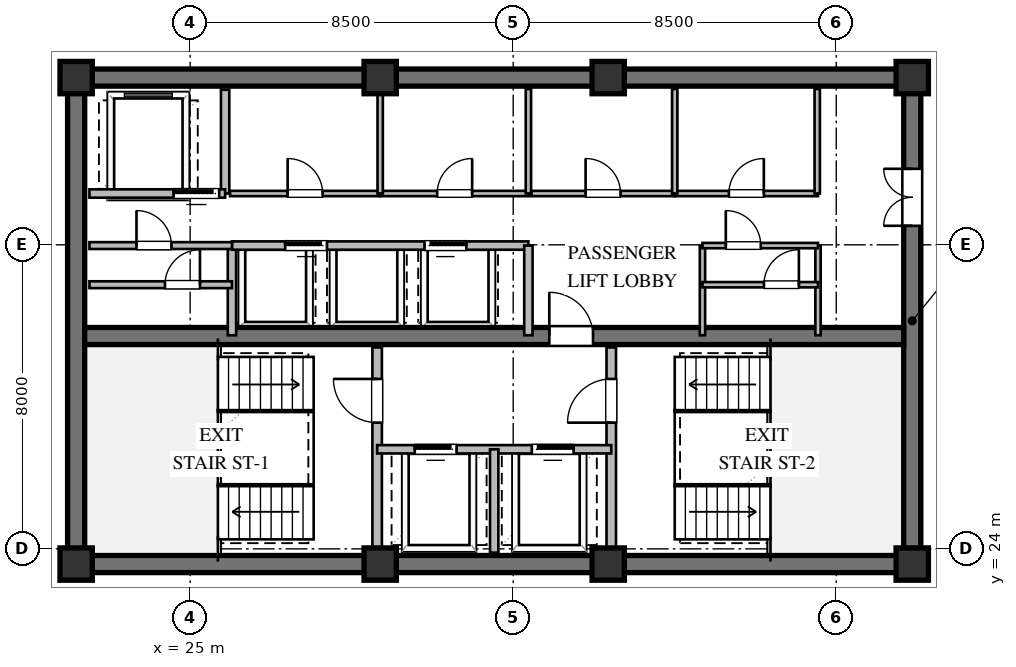
"""IFC4 building model, lengths in metres.
Left out: names, types, materials, properties, quantities, classifications, styles, units other than length and angle.
Written with IfcOpenShell. Run it as: python <this file> out.ifc"""

import sys

from ifc_helpers import new_model, si_unit, direction, frame, frame_2d, origin, origin_2d, place, context, subcontext, project, spatial, rectangle, extrude, element, fill, save


model = new_model("IFC4")
c1 = context("Model", 3, precision=1e-05, world=origin(), true_north=direction((0.0, 1.0)))
c2 = subcontext(c1, "Body", "Model", "MODEL_VIEW")
j1 = project(units=[si_unit("LENGTHUNIT", "METRE"), si_unit("PLANEANGLEUNIT", "RADIAN")], contexts=[c1])
p1 = place(None, origin())
s1 = spatial("IfcSite", under=j1, at=p1, CompositionType="ELEMENT")
p2 = place(p1, origin())
s2 = spatial("IfcBuilding", under=s1, at=p2, CompositionType="ELEMENT")
p3 = place(p2, frame((0.0, 0.0, 246.0)))
s3 = spatial("IfcBuildingStorey", under=s2, at=p3, CompositionType="ELEMENT", Elevation=246.0)
for number, where, z_axis, x_axis in (
    (1, (21.775, 23.6, 0.0), (0.0, 0.0, 1.0), (1.0, 0.0, 0.0)),
    (2, (21.775, 36.4, 0.0), (0.0, 0.0, 1.0), (1.0, 0.0, 0.0)),
):
    element("IfcWall", number, at=place(p3, frame(where, z_axis=z_axis, x_axis=x_axis)), inside=s3, PredefinedType="SHEAR", context=c2, shape_type="SweptSolid", body=[
        extrude(rectangle(XDim=22.45, YDim=0.45, at=frame_2d((11.225, 0.0))), origin(), (0.0, 0.0, 1.0), 3.36),
    ])
p4 = place(p3, frame((22.0, 23.825, 0.0), z_axis=(0.0, 0.0, 1.0), x_axis=(0.0, 1.0, 0.0)))
e3 = element("IfcWall", 3, at=p4, inside=s3, PredefinedType="SHEAR", context=c2, shape_type="SweptSolid", body=[
    extrude(rectangle(XDim=12.35, YDim=0.45, at=frame_2d((6.175, 0.0))), origin(), (0.0, 0.0, 1.0), 3.36),
])
p5 = place(p3, frame((44.0, 23.825, 0.0), z_axis=(0.0, 0.0, 1.0), x_axis=(0.0, 1.0, 0.0)))
e4 = element("IfcWall", 4, at=p5, inside=s3, PredefinedType="SHEAR", context=c2, shape_type="SweptSolid", body=[
    extrude(rectangle(XDim=12.35, YDim=0.45, at=frame_2d((6.175, 0.0))), origin(), (0.0, 0.0, 1.0), 3.36),
])
p6 = place(p5, frame((8.675, 0.0, 0.0)))
e5 = element("IfcOpeningElement", 5, at=p6, cuts=e4, PredefinedType="OPENING", context=c2, shape_type="SweptSolid", body=[
    extrude(rectangle(XDim=1.5, YDim=2.15, at=frame_2d((0.75, 1.075))), frame((0.0, 0.235, 0.0), z_axis=(0.0, -1.0, 0.0), x_axis=(1.0, 0.0, 0.0)), (0.0, 0.0, 1.0), 0.47),
])
p7 = place(p3, frame((22.225, 29.6, 0.0), z_axis=(0.0, 0.0, 1.0), x_axis=(1.0, 0.0, 0.0)))
e6 = element("IfcWall", 6, at=p7, inside=s3, PredefinedType="SHEAR", context=c2, shape_type="SweptSolid", body=[
    extrude(rectangle(XDim=21.55, YDim=0.45, at=frame_2d((10.775, 0.0))), origin(), (0.0, 0.0, 1.0), 3.36),
])
p8 = place(p7, frame((12.225, 0.0, 0.0)))
e7 = element("IfcOpeningElement", 7, at=p8, cuts=e6, PredefinedType="OPENING", context=c2, shape_type="SweptSolid", body=[
    extrude(rectangle(XDim=1.15, YDim=2.1, at=frame_2d((0.575, 1.05))), frame((0.0, 0.235, 0.0), z_axis=(0.0, -1.0, 0.0), x_axis=(1.0, 0.0, 0.0)), (0.0, 0.0, 1.0), 0.47),
])
for number, where, z_axis, x_axis in (
    (8, (22.0, 23.6, 0.0), (0.0, 0.0, 1.0), (1.0, 0.0, 0.0)),
    (9, (30.0, 23.6, 0.0), (0.0, 0.0, 1.0), (1.0, 0.0, 0.0)),
    (10, (36.0, 23.6, 0.0), (0.0, 0.0, 1.0), (1.0, 0.0, 0.0)),
    (11, (44.0, 23.6, 0.0), (0.0, 0.0, 1.0), (1.0, 0.0, 0.0)),
    (12, (44.0, 36.4, 0.0), (0.0, 0.0, 1.0), (1.0, 0.0, 0.0)),
    (13, (36.0, 36.4, 0.0), (0.0, 0.0, 1.0), (1.0, 0.0, 0.0)),
    (14, (30.0, 36.4, 0.0), (0.0, 0.0, 1.0), (1.0, 0.0, 0.0)),
    (15, (22.0, 36.4, 0.0), (0.0, 0.0, 1.0), (1.0, 0.0, 0.0)),
):
    element("IfcColumn", number, at=place(p3, frame(where, z_axis=z_axis, x_axis=x_axis)), inside=s3, PredefinedType="COLUMN", context=c2, shape_type="SweptSolid", body=[
        extrude(rectangle(XDim=0.85, YDim=0.85, at=origin_2d()), origin(), (0.0, 0.0, 1.0), 3.6),
    ])
p9 = place(p3, frame((29.92, 23.9, 0.0), z_axis=(0.0, 0.0, 1.0), x_axis=(0.0, 1.0, 0.0)))
e16 = element("IfcWall", 16, at=p9, inside=s3, PredefinedType="SOLIDWALL", context=c2, shape_type="SweptSolid", body=[
    extrude(rectangle(XDim=5.4, YDim=0.25, at=frame_2d((2.7, 0.0))), origin(), (0.0, 0.0, 1.0), 3.36),
])
p10 = place(p9, frame((3.421, 0.0, 0.0)))
e17 = element("IfcOpeningElement", 17, at=p10, cuts=e16, PredefinedType="OPENING", context=c2, shape_type="SweptSolid", body=[
    extrude(rectangle(XDim=1.15, YDim=2.1, at=frame_2d((0.575, 1.05))), frame((0.0, 0.135, 0.0), z_axis=(0.0, -1.0, 0.0), x_axis=(1.0, 0.0, 0.0)), (0.0, 0.0, 1.0), 0.27),
])
p11 = place(p3, frame((36.08, 23.9, 0.0), z_axis=(0.0, 0.0, 1.0), x_axis=(0.0, 1.0, 0.0)))
e18 = element("IfcWall", 18, at=p11, inside=s3, PredefinedType="SOLIDWALL", context=c2, shape_type="SweptSolid", body=[
    extrude(rectangle(XDim=5.4, YDim=0.25, at=frame_2d((2.7, 0.0))), origin(), (0.0, 0.0, 1.0), 3.36),
])
p12 = place(p11, frame((3.421, 0.0, 0.0)))
e19 = element("IfcOpeningElement", 19, at=p12, cuts=e18, PredefinedType="OPENING", context=c2, shape_type="SweptSolid", body=[
    extrude(rectangle(XDim=1.15, YDim=2.1, at=frame_2d((0.575, 1.05))), frame((0.0, 0.135, 0.0), z_axis=(0.0, -1.0, 0.0), x_axis=(1.0, 0.0, 0.0)), (0.0, 0.0, 1.0), 0.27),
])
p13 = place(p3, frame((29.92, 26.62, 0.0), z_axis=(0.0, 0.0, 1.0), x_axis=(1.0, 0.0, 0.0)))
e20 = element("IfcWall", 20, at=p13, inside=s3, PredefinedType="SOLIDWALL", context=c2, shape_type="SweptSolid", body=[
    extrude(rectangle(XDim=6.16, YDim=0.22, at=frame_2d((3.08, 0.0))), origin(), (0.0, 0.0, 1.0), 3.36),
])
p14 = place(p13, frame((0.99, 0.0, 0.0)))
e21 = element("IfcOpeningElement", 21, at=p14, cuts=e20, PredefinedType="OPENING", context=c2, shape_type="SweptSolid", body=[
    extrude(rectangle(XDim=1.1, YDim=2.1, at=frame_2d((0.55, 1.05))), frame((0.0, 0.12, 0.0), z_axis=(0.0, -1.0, 0.0), x_axis=(1.0, 0.0, 0.0)), (0.0, 0.0, 1.0), 0.24),
])
p15 = place(p13, frame((4.07, 0.0, 0.0)))
e22 = element("IfcOpeningElement", 22, at=p15, cuts=e20, PredefinedType="OPENING", context=c2, shape_type="SweptSolid", body=[
    extrude(rectangle(XDim=1.1, YDim=2.1, at=frame_2d((0.55, 1.05))), frame((0.0, 0.12, 0.0), z_axis=(0.0, -1.0, 0.0), x_axis=(1.0, 0.0, 0.0)), (0.0, 0.0, 1.0), 0.24),
])
p16 = place(p3, frame((33.0, 23.9, 0.0), z_axis=(0.0, 0.0, 1.0), x_axis=(0.0, 1.0, 0.0)))
e23 = element("IfcWall", 23, at=p16, inside=s3, PredefinedType="SOLIDWALL", context=c2, shape_type="SweptSolid", body=[
    extrude(rectangle(XDim=2.72, YDim=0.22, at=frame_2d((1.36, 0.0))), origin(), (0.0, 0.0, 1.0), 3.36),
])
p17 = place(p3, frame((25.92, 33.35, 0.0), z_axis=(0.0, 0.0, 1.0), x_axis=(0.0, 1.0, 0.0)))
e24 = element("IfcWall", 24, at=p17, inside=s3, PredefinedType="SOLIDWALL", context=c2, shape_type="SweptSolid", body=[
    extrude(rectangle(XDim=2.73, YDim=0.22, at=frame_2d((1.365, 0.0))), origin(), (0.0, 0.0, 1.0), 3.36),
])
p18 = place(p3, frame((22.35, 33.35, 0.0), z_axis=(0.0, 0.0, 1.0), x_axis=(1.0, 0.0, 0.0)))
e25 = element("IfcWall", 25, at=p18, inside=s3, PredefinedType="SOLIDWALL", context=c2, shape_type="SweptSolid", body=[
    extrude(rectangle(XDim=3.57, YDim=0.22, at=frame_2d((1.785, 0.0))), origin(), (0.0, 0.0, 1.0), 3.36),
])
p19 = place(p18, frame((2.213, 0.0, 0.0)))
e26 = element("IfcOpeningElement", 26, at=p19, cuts=e25, PredefinedType="OPENING", context=c2, shape_type="SweptSolid", body=[
    extrude(rectangle(XDim=1.2, YDim=2.1, at=frame_2d((0.6, 1.05))), frame((0.0, 0.12, 0.0), z_axis=(0.0, -1.0, 0.0), x_axis=(1.0, 0.0, 0.0)), (0.0, 0.0, 1.0), 0.24),
])
p20 = place(p3, frame((26.1, 29.62, 0.0), z_axis=(0.0, 0.0, 1.0), x_axis=(0.0, 1.0, 0.0)))
e27 = element("IfcWall", 27, at=p20, inside=s3, PredefinedType="SOLIDWALL", context=c2, shape_type="SweptSolid", body=[
    extrude(rectangle(XDim=2.36, YDim=0.22, at=frame_2d((1.18, 0.0))), origin(), (0.0, 0.0, 1.0), 3.36),
])
p21 = place(p3, frame((26.1, 31.98, 0.0), z_axis=(0.0, 0.0, 1.0), x_axis=(1.0, 0.0, 0.0)))
e28 = element("IfcWall", 28, at=p21, inside=s3, PredefinedType="SOLIDWALL", context=c2, shape_type="SweptSolid", body=[
    extrude(rectangle(XDim=7.8, YDim=0.22, at=frame_2d((3.9, 0.0))), origin(), (0.0, 0.0, 1.0), 3.36),
])
p22 = place(p21, frame((1.4, 0.0, 0.0)))
e29 = element("IfcOpeningElement", 29, at=p22, cuts=e28, PredefinedType="OPENING", context=c2, shape_type="SweptSolid", body=[
    extrude(rectangle(XDim=1.1, YDim=2.1, at=frame_2d((0.55, 1.05))), frame((0.0, 0.12, 0.0), z_axis=(0.0, -1.0, 0.0), x_axis=(1.0, 0.0, 0.0)), (0.0, 0.0, 1.0), 0.24),
])
p23 = place(p21, frame((5.066, 0.0, 0.0)))
e30 = element("IfcOpeningElement", 30, at=p23, cuts=e28, PredefinedType="OPENING", context=c2, shape_type="SweptSolid", body=[
    extrude(rectangle(XDim=1.1, YDim=2.1, at=frame_2d((0.55, 1.05))), frame((0.0, 0.12, 0.0), z_axis=(0.0, -1.0, 0.0), x_axis=(1.0, 0.0, 0.0)), (0.0, 0.0, 1.0), 0.24),
])
p24 = place(p3, frame((33.9, 29.62, 0.0), z_axis=(0.0, 0.0, 1.0), x_axis=(0.0, 1.0, 0.0)))
e31 = element("IfcWall", 31, at=p24, inside=s3, PredefinedType="SOLIDWALL", context=c2, shape_type="SweptSolid", body=[
    extrude(rectangle(XDim=2.36, YDim=0.22, at=frame_2d((1.18, 0.0))), origin(), (0.0, 0.0, 1.0), 3.36),
])
p25 = place(p3, frame((26.05, 33.35, 0.0), z_axis=(0.0, 0.0, 1.0), x_axis=(1.0, 0.0, 0.0)))
e32 = element("IfcWall", 32, at=p25, inside=s3, PredefinedType="PARTITIONING", context=c2, shape_type="SweptSolid", body=[
    extrude(rectangle(XDim=3.95, YDim=0.14, at=frame_2d((1.975, 0.0))), origin(), (0.0, 0.0, 1.0), 3.36),
])
p26 = place(p25, frame((1.515, 0.0, 0.0)))
e33 = element("IfcOpeningElement", 33, at=p26, cuts=e32, PredefinedType="OPENING", context=c2, shape_type="SweptSolid", body=[
    extrude(rectangle(XDim=0.92, YDim=2.1, at=frame_2d((0.46, 1.05))), frame((0.0, 0.08, 0.0), z_axis=(0.0, -1.0, 0.0), x_axis=(1.0, 0.0, 0.0)), (0.0, 0.0, 1.0), 0.16),
])
p27 = place(p3, frame((30.0, 33.35, 0.0), z_axis=(0.0, 0.0, 1.0), x_axis=(1.0, 0.0, 0.0)))
e34 = element("IfcWall", 34, at=p27, inside=s3, PredefinedType="PARTITIONING", context=c2, shape_type="SweptSolid", body=[
    extrude(rectangle(XDim=3.92, YDim=0.14, at=frame_2d((1.96, 0.0))), origin(), (0.0, 0.0, 1.0), 3.36),
])
p28 = place(p27, frame((1.5, 0.0, 0.0)))
e35 = element("IfcOpeningElement", 35, at=p28, cuts=e34, PredefinedType="OPENING", context=c2, shape_type="SweptSolid", body=[
    extrude(rectangle(XDim=0.92, YDim=2.1, at=frame_2d((0.46, 1.05))), frame((0.0, 0.08, 0.0), z_axis=(0.0, -1.0, 0.0), x_axis=(1.0, 0.0, 0.0)), (0.0, 0.0, 1.0), 0.16),
])
for number, where, z_axis, x_axis in (
    (36, (30.0, 33.35, 0.0), (0.0, 0.0, 1.0), (0.0, 1.0, 0.0)),
    (37, (33.9, 33.35, 0.0), (0.0, 0.0, 1.0), (0.0, 1.0, 0.0)),
):
    element("IfcWall", number, at=place(p3, frame(where, z_axis=z_axis, x_axis=x_axis)), inside=s3, PredefinedType="PARTITIONING", context=c2, shape_type="SweptSolid", body=[
        extrude(rectangle(XDim=2.75, YDim=0.14, at=frame_2d((1.375, 0.0))), origin(), (0.0, 0.0, 1.0), 3.36),
    ])
p29 = place(p3, frame((33.98, 33.35, 0.0), z_axis=(0.0, 0.0, 1.0), x_axis=(1.0, 0.0, 0.0)))
e38 = element("IfcWall", 38, at=p29, inside=s3, PredefinedType="PARTITIONING", context=c2, shape_type="SweptSolid", body=[
    extrude(rectangle(XDim=3.77, YDim=0.14, at=frame_2d((1.885, 0.0))), origin(), (0.0, 0.0, 1.0), 3.36),
])
p30 = place(p29, frame((1.425, 0.0, 0.0)))
e39 = element("IfcOpeningElement", 39, at=p30, cuts=e38, PredefinedType="OPENING", context=c2, shape_type="SweptSolid", body=[
    extrude(rectangle(XDim=0.92, YDim=2.1, at=frame_2d((0.46, 1.05))), frame((0.0, 0.08, 0.0), z_axis=(0.0, -1.0, 0.0), x_axis=(1.0, 0.0, 0.0)), (0.0, 0.0, 1.0), 0.16),
])
p31 = place(p3, frame((37.75, 33.35, 0.0), z_axis=(0.0, 0.0, 1.0), x_axis=(1.0, 0.0, 0.0)))
e40 = element("IfcWall", 40, at=p31, inside=s3, PredefinedType="PARTITIONING", context=c2, shape_type="SweptSolid", body=[
    extrude(rectangle(XDim=3.77, YDim=0.14, at=frame_2d((1.885, 0.0))), origin(), (0.0, 0.0, 1.0), 3.36),
])
p32 = place(p31, frame((1.425, 0.0, 0.0)))
e41 = element("IfcOpeningElement", 41, at=p32, cuts=e40, PredefinedType="OPENING", context=c2, shape_type="SweptSolid", body=[
    extrude(rectangle(XDim=0.92, YDim=2.1, at=frame_2d((0.46, 1.05))), frame((0.0, 0.08, 0.0), z_axis=(0.0, -1.0, 0.0), x_axis=(1.0, 0.0, 0.0)), (0.0, 0.0, 1.0), 0.16),
])
for number, where, z_axis, x_axis in (
    (42, (37.75, 33.35, 0.0), (0.0, 0.0, 1.0), (0.0, 1.0, 0.0)),
    (43, (41.5, 33.35, 0.0), (0.0, 0.0, 1.0), (0.0, 1.0, 0.0)),
):
    element("IfcWall", number, at=place(p3, frame(where, z_axis=z_axis, x_axis=x_axis)), inside=s3, PredefinedType="PARTITIONING", context=c2, shape_type="SweptSolid", body=[
        extrude(rectangle(XDim=2.75, YDim=0.14, at=frame_2d((1.375, 0.0))), origin(), (0.0, 0.0, 1.0), 3.36),
    ])
p33 = place(p3, frame((22.35, 30.95, 0.0), z_axis=(0.0, 0.0, 1.0), x_axis=(1.0, 0.0, 0.0)))
e44 = element("IfcWall", 44, at=p33, inside=s3, PredefinedType="PARTITIONING", context=c2, shape_type="SweptSolid", body=[
    extrude(rectangle(XDim=3.75, YDim=0.18, at=frame_2d((1.875, 0.0))), origin(), (0.0, 0.0, 1.0), 3.36),
])
p34 = place(p33, frame((1.988, 0.0, 0.0)))
e45 = element("IfcOpeningElement", 45, at=p34, cuts=e44, PredefinedType="OPENING", context=c2, shape_type="SweptSolid", body=[
    extrude(rectangle(XDim=0.92, YDim=2.1, at=frame_2d((0.46, 1.05))), frame((0.0, 0.1, 0.0), z_axis=(0.0, -1.0, 0.0), x_axis=(1.0, 0.0, 0.0)), (0.0, 0.0, 1.0), 0.2),
])
p35 = place(p3, frame((22.35, 31.98, 0.0), z_axis=(0.0, 0.0, 1.0), x_axis=(1.0, 0.0, 0.0)))
e46 = element("IfcWall", 46, at=p35, inside=s3, PredefinedType="PARTITIONING", context=c2, shape_type="SweptSolid", body=[
    extrude(rectangle(XDim=3.75, YDim=0.18, at=frame_2d((1.875, 0.0))), origin(), (0.0, 0.0, 1.0), 3.36),
])
p36 = place(p35, frame((1.238, 0.0, 0.0)))
e47 = element("IfcOpeningElement", 47, at=p36, cuts=e46, PredefinedType="OPENING", context=c2, shape_type="SweptSolid", body=[
    extrude(rectangle(XDim=0.92, YDim=2.1, at=frame_2d((0.46, 1.05))), frame((0.0, 0.1, 0.0), z_axis=(0.0, -1.0, 0.0), x_axis=(1.0, 0.0, 0.0)), (0.0, 0.0, 1.0), 0.2),
])
for number, where, z_axis, x_axis in (
    (48, (38.48, 29.62, 0.0), (0.0, 0.0, 1.0), (0.0, 1.0, 0.0)),
    (49, (41.52, 29.62, 0.0), (0.0, 0.0, 1.0), (0.0, 1.0, 0.0)),
):
    element("IfcWall", number, at=place(p3, frame(where, z_axis=z_axis, x_axis=x_axis)), inside=s3, PredefinedType="PARTITIONING", context=c2, shape_type="SweptSolid", body=[
        extrude(rectangle(XDim=2.36, YDim=0.14, at=frame_2d((1.18, 0.0))), origin(), (0.0, 0.0, 1.0), 3.36),
    ])
p37 = place(p3, frame((38.48, 30.95, 0.0), z_axis=(0.0, 0.0, 1.0), x_axis=(1.0, 0.0, 0.0)))
e50 = element("IfcWall", 50, at=p37, inside=s3, PredefinedType="PARTITIONING", context=c2, shape_type="SweptSolid", body=[
    extrude(rectangle(XDim=3.04, YDim=0.14, at=frame_2d((1.52, 0.0))), origin(), (0.0, 0.0, 1.0), 3.36),
])
p38 = place(p37, frame((1.617, 0.0, 0.0)))
e51 = element("IfcOpeningElement", 51, at=p38, cuts=e50, PredefinedType="OPENING", context=c2, shape_type="SweptSolid", body=[
    extrude(rectangle(XDim=0.92, YDim=2.1, at=frame_2d((0.46, 1.05))), frame((0.0, 0.08, 0.0), z_axis=(0.0, -1.0, 0.0), x_axis=(1.0, 0.0, 0.0)), (0.0, 0.0, 1.0), 0.16),
])
p39 = place(p3, frame((38.48, 31.98, 0.0), z_axis=(0.0, 0.0, 1.0), x_axis=(1.0, 0.0, 0.0)))
e52 = element("IfcWall", 52, at=p39, inside=s3, PredefinedType="PARTITIONING", context=c2, shape_type="SweptSolid", body=[
    extrude(rectangle(XDim=3.04, YDim=0.14, at=frame_2d((1.52, 0.0))), origin(), (0.0, 0.0, 1.0), 3.36),
])
p40 = place(p39, frame((0.614, 0.0, 0.0)))
e53 = element("IfcOpeningElement", 53, at=p40, cuts=e52, PredefinedType="OPENING", context=c2, shape_type="SweptSolid", body=[
    extrude(rectangle(XDim=0.92, YDim=2.1, at=frame_2d((0.46, 1.05))), frame((0.0, 0.08, 0.0), z_axis=(0.0, -1.0, 0.0), x_axis=(1.0, 0.0, 0.0)), (0.0, 0.0, 1.0), 0.16),
])
p41 = place(p10, origin())
e54 = element("IfcDoor", 54, at=p41, inside=s3, OperationType="SINGLE_SWING_RIGHT", PredefinedType="DOOR", context=c2, shape_type="SweptSolid", body=[
    extrude(rectangle(XDim=1.15, YDim=2.1, at=frame_2d((0.575, 1.05))), frame((0.0, 0.025, 0.0), z_axis=(0.0, -1.0, 0.0), x_axis=(1.0, 0.0, 0.0)), (0.0, 0.0, 1.0), 0.05),
])
fill(e17, e54)
p42 = place(p12, origin())
e55 = element("IfcDoor", 55, at=p42, inside=s3, OperationType="SINGLE_SWING_LEFT", PredefinedType="DOOR", context=c2, shape_type="SweptSolid", body=[
    extrude(rectangle(XDim=1.15, YDim=2.1, at=frame_2d((0.575, 1.05))), frame((0.0, 0.025, 0.0), z_axis=(0.0, -1.0, 0.0), x_axis=(1.0, 0.0, 0.0)), (0.0, 0.0, 1.0), 0.05),
])
fill(e19, e55)
p43 = place(p14, origin())
e56 = element("IfcDoor", 56, at=p43, inside=s3, OperationType="SLIDING_TO_LEFT", PredefinedType="DOOR", context=c2, shape_type="SweptSolid", body=[
    extrude(rectangle(XDim=1.1, YDim=2.1, at=frame_2d((0.55, 1.05))), frame((0.0, 0.025, 0.0), z_axis=(0.0, -1.0, 0.0), x_axis=(1.0, 0.0, 0.0)), (0.0, 0.0, 1.0), 0.05),
])
fill(e21, e56)
p44 = place(p15, origin())
e57 = element("IfcDoor", 57, at=p44, inside=s3, OperationType="SLIDING_TO_RIGHT", PredefinedType="DOOR", context=c2, shape_type="SweptSolid", body=[
    extrude(rectangle(XDim=1.1, YDim=2.1, at=frame_2d((0.55, 1.05))), frame((0.0, 0.025, 0.0), z_axis=(0.0, -1.0, 0.0), x_axis=(1.0, 0.0, 0.0)), (0.0, 0.0, 1.0), 0.05),
])
fill(e22, e57)
p45 = place(p8, origin())
e58 = element("IfcDoor", 58, at=p45, inside=s3, OperationType="SINGLE_SWING_LEFT", PredefinedType="DOOR", context=c2, shape_type="SweptSolid", body=[
    extrude(rectangle(XDim=1.15, YDim=2.1, at=frame_2d((0.575, 1.05))), frame((0.0, 0.025, 0.0), z_axis=(0.0, -1.0, 0.0), x_axis=(1.0, 0.0, 0.0)), (0.0, 0.0, 1.0), 0.05),
])
fill(e7, e58)
p46 = place(p6, origin())
e59 = element("IfcDoor", 59, at=p46, inside=s3, OperationType="DOUBLE_DOOR_SINGLE_SWING", PredefinedType="DOOR", context=c2, shape_type="SweptSolid", body=[
    extrude(rectangle(XDim=1.5, YDim=2.15, at=frame_2d((0.75, 1.075))), frame((0.0, 0.025, 0.0), z_axis=(0.0, -1.0, 0.0), x_axis=(1.0, 0.0, 0.0)), (0.0, 0.0, 1.0), 0.05),
])
fill(e5, e59)
p47 = place(p19, origin())
e60 = element("IfcDoor", 60, at=p47, inside=s3, OperationType="SLIDING_TO_LEFT", PredefinedType="DOOR", context=c2, shape_type="SweptSolid", body=[
    extrude(rectangle(XDim=1.2, YDim=2.1, at=frame_2d((0.6, 1.05))), frame((0.0, 0.025, 0.0), z_axis=(0.0, -1.0, 0.0), x_axis=(1.0, 0.0, 0.0)), (0.0, 0.0, 1.0), 0.05),
])
fill(e26, e60)
p48 = place(p22, origin())
e61 = element("IfcDoor", 61, at=p48, inside=s3, OperationType="SLIDING_TO_LEFT", PredefinedType="DOOR", context=c2, shape_type="SweptSolid", body=[
    extrude(rectangle(XDim=1.1, YDim=2.1, at=frame_2d((0.55, 1.05))), frame((0.0, 0.025, 0.0), z_axis=(0.0, -1.0, 0.0), x_axis=(1.0, 0.0, 0.0)), (0.0, 0.0, 1.0), 0.05),
])
fill(e29, e61)
p49 = place(p23, origin())
e62 = element("IfcDoor", 62, at=p49, inside=s3, OperationType="SLIDING_TO_RIGHT", PredefinedType="DOOR", context=c2, shape_type="SweptSolid", body=[
    extrude(rectangle(XDim=1.1, YDim=2.1, at=frame_2d((0.55, 1.05))), frame((0.0, 0.025, 0.0), z_axis=(0.0, -1.0, 0.0), x_axis=(1.0, 0.0, 0.0)), (0.0, 0.0, 1.0), 0.05),
])
fill(e30, e62)
p50 = place(p26, origin())
e63 = element("IfcDoor", 63, at=p50, inside=s3, OperationType="SINGLE_SWING_LEFT", PredefinedType="DOOR", context=c2, shape_type="SweptSolid", body=[
    extrude(rectangle(XDim=0.92, YDim=2.1, at=frame_2d((0.46, 1.05))), frame((0.0, 0.025, 0.0), z_axis=(0.0, -1.0, 0.0), x_axis=(1.0, 0.0, 0.0)), (0.0, 0.0, 1.0), 0.05),
])
fill(e33, e63)
p51 = place(p28, origin())
e64 = element("IfcDoor", 64, at=p51, inside=s3, OperationType="SINGLE_SWING_RIGHT", PredefinedType="DOOR", context=c2, shape_type="SweptSolid", body=[
    extrude(rectangle(XDim=0.92, YDim=2.1, at=frame_2d((0.46, 1.05))), frame((0.0, 0.025, 0.0), z_axis=(0.0, -1.0, 0.0), x_axis=(1.0, 0.0, 0.0)), (0.0, 0.0, 1.0), 0.05),
])
fill(e35, e64)
p52 = place(p30, origin())
e65 = element("IfcDoor", 65, at=p52, inside=s3, OperationType="SINGLE_SWING_LEFT", PredefinedType="DOOR", context=c2, shape_type="SweptSolid", body=[
    extrude(rectangle(XDim=0.92, YDim=2.1, at=frame_2d((0.46, 1.05))), frame((0.0, 0.025, 0.0), z_axis=(0.0, -1.0, 0.0), x_axis=(1.0, 0.0, 0.0)), (0.0, 0.0, 1.0), 0.05),
])
fill(e39, e65)
p53 = place(p32, origin())
e66 = element("IfcDoor", 66, at=p53, inside=s3, OperationType="SINGLE_SWING_RIGHT", PredefinedType="DOOR", context=c2, shape_type="SweptSolid", body=[
    extrude(rectangle(XDim=0.92, YDim=2.1, at=frame_2d((0.46, 1.05))), frame((0.0, 0.025, 0.0), z_axis=(0.0, -1.0, 0.0), x_axis=(1.0, 0.0, 0.0)), (0.0, 0.0, 1.0), 0.05),
])
fill(e41, e66)
p54 = place(p36, origin())
e67 = element("IfcDoor", 67, at=p54, inside=s3, OperationType="SINGLE_SWING_LEFT", PredefinedType="DOOR", context=c2, shape_type="SweptSolid", body=[
    extrude(rectangle(XDim=0.92, YDim=2.1, at=frame_2d((0.46, 1.05))), frame((0.0, 0.025, 0.0), z_axis=(0.0, -1.0, 0.0), x_axis=(1.0, 0.0, 0.0)), (0.0, 0.0, 1.0), 0.05),
])
fill(e47, e67)
p55 = place(p34, origin())
e68 = element("IfcDoor", 68, at=p55, inside=s3, OperationType="SINGLE_SWING_RIGHT", PredefinedType="DOOR", context=c2, shape_type="SweptSolid", body=[
    extrude(rectangle(XDim=0.92, YDim=2.1, at=frame_2d((0.46, 1.05))), frame((0.0, 0.025, 0.0), z_axis=(0.0, -1.0, 0.0), x_axis=(1.0, 0.0, 0.0)), (0.0, 0.0, 1.0), 0.05),
])
fill(e45, e68)
p56 = place(p40, origin())
e69 = element("IfcDoor", 69, at=p56, inside=s3, OperationType="SINGLE_SWING_LEFT", PredefinedType="DOOR", context=c2, shape_type="SweptSolid", body=[
    extrude(rectangle(XDim=0.92, YDim=2.1, at=frame_2d((0.46, 1.05))), frame((0.0, 0.025, 0.0), z_axis=(0.0, -1.0, 0.0), x_axis=(1.0, 0.0, 0.0)), (0.0, 0.0, 1.0), 0.05),
])
fill(e53, e69)
p57 = place(p38, origin())
e70 = element("IfcDoor", 70, at=p57, inside=s3, OperationType="SINGLE_SWING_RIGHT", PredefinedType="DOOR", context=c2, shape_type="SweptSolid", body=[
    extrude(rectangle(XDim=0.92, YDim=2.1, at=frame_2d((0.46, 1.05))), frame((0.0, 0.025, 0.0), z_axis=(0.0, -1.0, 0.0), x_axis=(1.0, 0.0, 0.0)), (0.0, 0.0, 1.0), 0.05),
])
fill(e51, e70)
save(model, sys.argv[1])
